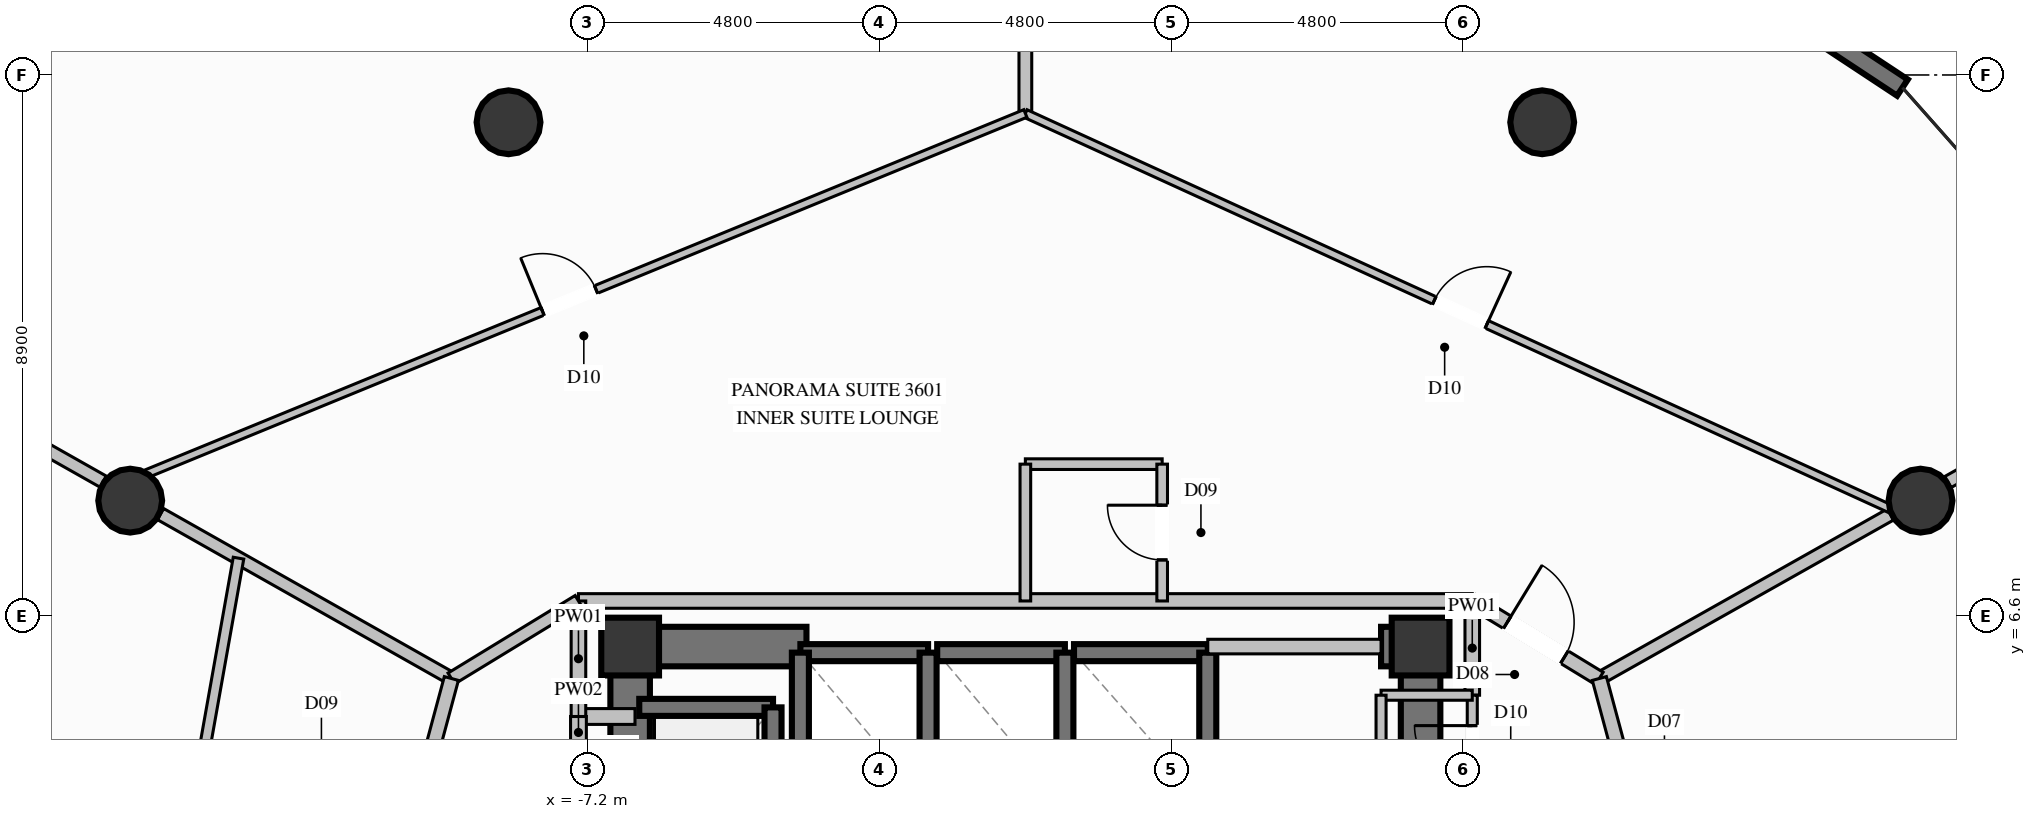
"""IFC4 building model, lengths in metres.
Left out: names, types, materials, properties, quantities, classifications, styles, units other than length and angle.
Written with IfcOpenShell. Run it as: python <this file> out.ifc"""

import sys

from ifc_helpers import new_model, si_unit, direction, frame, frame_2d, origin, origin_2d, place, context, subcontext, project, spatial, rectangle, circle, extrude, element, fill, save


model = new_model("IFC4")
c1 = context("Model", 3, precision=1e-05, world=origin(), true_north=direction((0.0, 1.0)))
c2 = subcontext(c1, "Body", "Model", "MODEL_VIEW")
j1 = project(units=[si_unit("LENGTHUNIT", "METRE"), si_unit("PLANEANGLEUNIT", "RADIAN")], contexts=[c1])
p1 = place(None, origin())
s1 = spatial("IfcSite", under=j1, at=p1, CompositionType="ELEMENT")
p2 = place(p1, origin())
s2 = spatial("IfcBuilding", under=s1, at=p2, CompositionType="ELEMENT")
p3 = place(p2, frame((0.0, 0.0, 135.0)))
s3 = spatial("IfcBuildingStorey", under=s2, at=p3, CompositionType="ELEMENT", Elevation=135.0)
for number, where, z_axis, x_axis in (
    (1, (6.5, 6.1, 0.0), (0.0, 0.0, 1.0), (1.0, 0.0, 0.0)),
    (2, (-6.5, 6.1, 0.0), (0.0, 0.0, 1.0), (1.0, 0.0, 0.0)),
):
    element("IfcColumn", number, at=place(p3, frame(where, z_axis=z_axis, x_axis=x_axis)), inside=s3, PredefinedType="COLUMN", context=c2, shape_type="SweptSolid", body=[
        extrude(rectangle(XDim=0.95, YDim=0.95, at=origin_2d()), origin(), (0.0, 0.0, 1.0), 3.6),
    ])
p4 = place(p3, frame((-6.175, 6.1, 0.0), z_axis=(0.0, 0.0, 1.0), x_axis=(1.0, 0.0, 0.0)))
e3 = element("IfcWall", 3, at=p4, inside=s3, PredefinedType="SHEAR", context=c2, shape_type="SweptSolid", body=[
    extrude(rectangle(XDim=2.575, YDim=0.65, at=frame_2d((1.288, 0.0))), origin(), (0.0, 0.0, 1.0), 3.6),
])
p5 = place(p3, frame((5.85, 6.1, 0.0), z_axis=(0.0, 0.0, 1.0), x_axis=(1.0, 0.0, 0.0)))
e4 = element("IfcWall", 4, at=p5, inside=s3, PredefinedType="SHEAR", context=c2, shape_type="SweptSolid", body=[
    extrude(rectangle(XDim=0.325, YDim=0.65, at=frame_2d((0.163, 0.0))), origin(), (0.0, 0.0, 1.0), 3.6),
])
p6 = place(p3, frame((-6.5, 2.35, 0.0), z_axis=(0.0, 0.0, 1.0), x_axis=(0.0, 1.0, 0.0)))
e5 = element("IfcWall", 5, at=p6, inside=s3, PredefinedType="SHEAR", context=c2, shape_type="SweptSolid", body=[
    extrude(rectangle(XDim=4.075, YDim=0.65, at=frame_2d((2.038, 0.0))), origin(), (0.0, 0.0, 1.0), 3.6),
])
p7 = place(p3, frame((6.5, 3.35, 0.0), z_axis=(0.0, 0.0, 1.0), x_axis=(0.0, 1.0, 0.0)))
e6 = element("IfcWall", 6, at=p7, inside=s3, PredefinedType="SHEAR", context=c2, shape_type="SweptSolid", body=[
    extrude(rectangle(XDim=3.075, YDim=0.65, at=frame_2d((1.538, 0.0))), origin(), (0.0, 0.0, 1.0), 3.6),
])
for number, where, z_axis, x_axis in (
    (7, (14.722, 8.5, 0.0), (0.0, 0.0, 1.0), (1.0, 0.0, 0.0)),
    (8, (8.5, 14.722, 0.0), (0.0, 0.0, 1.0), (1.0, 0.0, 0.0)),
    (9, (-8.5, 14.722, 0.0), (0.0, 0.0, 1.0), (1.0, 0.0, 0.0)),
    (10, (-14.722, 8.5, 0.0), (0.0, 0.0, 1.0), (1.0, 0.0, 0.0)),
):
    element("IfcColumn", number, at=place(p3, frame(where, z_axis=z_axis, x_axis=x_axis)), inside=s3, PredefinedType="COLUMN", context=c2, shape_type="SweptSolid", body=[
        extrude(circle(Radius=0.525, at=origin_2d()), origin(), (0.0, 0.0, 1.0), 3.6),
    ])
p8 = place(p3, frame((8.116, 19.456, 0.0), z_axis=(0.0, 0.0, 1.0), x_axis=(0.834605249122, -0.550848507431, 0.0)))
e11 = element("IfcWall", 11, at=p8, inside=s3, PredefinedType="SOLIDWALL", context=c2, shape_type="SweptSolid", body=[
    extrude(rectangle(XDim=7.559, YDim=0.32, at=frame_2d((3.78, 0.0))), origin(), (0.0, 0.0, 1.0), 3.35),
])
p9 = place(p8, frame((2.88, 0.0, 0.35)))
e12 = element("IfcOpeningElement", 12, at=p9, cuts=e11, PredefinedType="OPENING", context=c2, shape_type="SweptSolid", body=[
    extrude(rectangle(XDim=1.8, YDim=2.6, at=frame_2d((0.9, 1.3))), frame((0.0, 0.17, 0.0), z_axis=(0.0, -1.0, 0.0), x_axis=(1.0, 0.0, 0.0)), (0.0, 0.0, 1.0), 0.34),
])
p10 = place(p3, frame((-17.163, 15.897, 0.0), z_axis=(0.0, 0.0, 1.0), x_axis=(0.784850386513, 0.619685299802, 0.0)))
e13 = element("IfcWall", 13, at=p10, inside=s3, PredefinedType="SOLIDWALL", context=c2, shape_type="SweptSolid", body=[
    extrude(rectangle(XDim=6.369, YDim=0.32, at=frame_2d((3.185, 0.0))), origin(), (0.0, 0.0, 1.0), 3.35),
])
p11 = place(p10, frame((2.285, 0.0, 0.35)))
e14 = element("IfcOpeningElement", 14, at=p11, cuts=e13, PredefinedType="OPENING", context=c2, shape_type="SweptSolid", body=[
    extrude(rectangle(XDim=1.8, YDim=2.6, at=frame_2d((0.9, 1.3))), frame((0.0, 0.17, 0.0), z_axis=(0.0, -1.0, 0.0), x_axis=(1.0, 0.0, 0.0)), (0.0, 0.0, 1.0), 0.34),
])
p12 = place(p3, frame((-1.6, 6.0, 0.0), z_axis=(0.0, 0.0, 1.0), x_axis=(-1.0, 0.0, 0.0)))
e15 = element("IfcWall", 15, at=p12, inside=s3, PredefinedType="SOLIDWALL", context=c2, shape_type="SweptSolid", body=[
    extrude(rectangle(XDim=2.1, YDim=0.28, at=frame_2d((1.05, 0.0))), origin(), (0.0, 0.0, 1.0), 3.35),
])
for number, where, z_axis, x_axis in (
    (16, (-3.7, 6.0, 0.0), (0.0, 0.0, 1.0), (0.0, -1.0, 0.0)),
    (17, (-1.6, 3.5, 0.0), (0.0, 0.0, 1.0), (0.0, 1.0, 0.0)),
):
    element("IfcWall", number, at=place(p3, frame(where, z_axis=z_axis, x_axis=x_axis)), inside=s3, PredefinedType="SOLIDWALL", context=c2, shape_type="SweptSolid", body=[
        extrude(rectangle(XDim=2.5, YDim=0.28, at=frame_2d((1.25, 0.0))), origin(), (0.0, 0.0, 1.0), 3.35),
    ])
p13 = place(p3, frame((0.65, 6.0, 0.0), z_axis=(0.0, 0.0, 1.0), x_axis=(-1.0, 0.0, 0.0)))
e18 = element("IfcWall", 18, at=p13, inside=s3, PredefinedType="SOLIDWALL", context=c2, shape_type="SweptSolid", body=[
    extrude(rectangle(XDim=2.1, YDim=0.28, at=frame_2d((1.05, 0.0))), origin(), (0.0, 0.0, 1.0), 3.35),
])
p14 = place(p3, frame((0.65, 3.5, 0.0), z_axis=(0.0, 0.0, 1.0), x_axis=(0.0, 1.0, 0.0)))
e19 = element("IfcWall", 19, at=p14, inside=s3, PredefinedType="SOLIDWALL", context=c2, shape_type="SweptSolid", body=[
    extrude(rectangle(XDim=2.5, YDim=0.28, at=frame_2d((1.25, 0.0))), origin(), (0.0, 0.0, 1.0), 3.35),
])
p15 = place(p3, frame((3.0, 6.0, 0.0), z_axis=(0.0, 0.0, 1.0), x_axis=(-1.0, 0.0, 0.0)))
e20 = element("IfcWall", 20, at=p15, inside=s3, PredefinedType="SOLIDWALL", context=c2, shape_type="SweptSolid", body=[
    extrude(rectangle(XDim=2.2, YDim=0.28, at=frame_2d((1.1, 0.0))), origin(), (0.0, 0.0, 1.0), 3.35),
])
p16 = place(p3, frame((3.0, 3.5, 0.0), z_axis=(0.0, 0.0, 1.0), x_axis=(0.0, 1.0, 0.0)))
e21 = element("IfcWall", 21, at=p16, inside=s3, PredefinedType="SOLIDWALL", context=c2, shape_type="SweptSolid", body=[
    extrude(rectangle(XDim=2.5, YDim=0.28, at=frame_2d((1.25, 0.0))), origin(), (0.0, 0.0, 1.0), 3.35),
])
p17 = place(p3, frame((-4.15, 5.1, 0.0), z_axis=(0.0, 0.0, 1.0), x_axis=(-1.0, 0.0, 0.0)))
e22 = element("IfcWall", 22, at=p17, inside=s3, PredefinedType="SOLIDWALL", context=c2, shape_type="SweptSolid", body=[
    extrude(rectangle(XDim=2.2, YDim=0.28, at=frame_2d((1.1, 0.0))), origin(), (0.0, 0.0, 1.0), 3.35),
])
p18 = place(p3, frame((-4.15, 2.4, 0.0), z_axis=(0.0, 0.0, 1.0), x_axis=(0.0, 1.0, 0.0)))
e23 = element("IfcWall", 23, at=p18, inside=s3, PredefinedType="SOLIDWALL", context=c2, shape_type="SweptSolid", body=[
    extrude(rectangle(XDim=2.7, YDim=0.28, at=frame_2d((1.35, 0.0))), origin(), (0.0, 0.0, 1.0), 3.35),
])
p19 = place(p3, frame((-7.35, 4.95, 0.0), z_axis=(0.0, 0.0, 1.0), x_axis=(1.0, 0.0, 0.0)))
e24 = element("IfcWall", 24, at=p19, inside=s3, PredefinedType="PARTITIONING", context=c2, shape_type="SweptSolid", body=[
    extrude(rectangle(XDim=0.93, YDim=0.26, at=frame_2d((0.465, 0.0))), origin(), (0.0, 0.0, 1.0), 3.35),
])
p20 = place(p3, frame((-7.35, 2.55, 0.0), z_axis=(0.0, 0.0, 1.0), x_axis=(0.0, 1.0, 0.0)))
e25 = element("IfcWall", 25, at=p20, inside=s3, PredefinedType="PARTITIONING", context=c2, shape_type="SweptSolid", body=[
    extrude(rectangle(XDim=2.4, YDim=0.26, at=frame_2d((1.2, 0.0))), origin(), (0.0, 0.0, 1.0), 2.435),
])
p21 = place(p20, frame((0.775, 0.0, 0.0)))
e26 = element("IfcOpeningElement", 26, at=p21, cuts=e25, PredefinedType="OPENING", context=c2, shape_type="SweptSolid", body=[
    extrude(rectangle(XDim=0.85, YDim=2.05, at=frame_2d((0.425, 1.025))), frame((0.0, 0.14, 0.0), z_axis=(0.0, -1.0, 0.0), x_axis=(1.0, 0.0, 0.0)), (0.0, 0.0, 1.0), 0.28),
])
p22 = place(p3, frame((-7.35, 6.85, 0.0), z_axis=(0.0, 0.0, 1.0), x_axis=(1.0, 0.0, 0.0)))
e27 = element("IfcWall", 27, at=p22, inside=s3, PredefinedType="PARTITIONING", context=c2, shape_type="SweptSolid", body=[
    extrude(rectangle(XDim=14.7, YDim=0.24, at=frame_2d((7.35, 0.0))), origin(), (0.0, 0.0, 1.0), 2.435),
])
p23 = place(p3, frame((-7.35, 4.95, 0.0), z_axis=(0.0, 0.0, 1.0), x_axis=(0.0, 1.0, 0.0)))
e28 = element("IfcWall", 28, at=p23, inside=s3, PredefinedType="PARTITIONING", context=c2, shape_type="SweptSolid", body=[
    extrude(rectangle(XDim=1.9, YDim=0.24, at=frame_2d((0.95, 0.0))), origin(), (0.0, 0.0, 1.0), 2.435),
])
p24 = place(p3, frame((7.35, 5.3, 0.0), z_axis=(0.0, 0.0, 1.0), x_axis=(0.0, 1.0, 0.0)))
e29 = element("IfcWall", 29, at=p24, inside=s3, PredefinedType="PARTITIONING", context=c2, shape_type="SweptSolid", body=[
    extrude(rectangle(XDim=1.55, YDim=0.24, at=frame_2d((0.775, 0.0))), origin(), (0.0, 0.0, 1.0), 2.435),
])
p25 = place(p3, frame((3.0, 6.1, 0.0), z_axis=(0.0, 0.0, 1.0), x_axis=(1.0, 0.0, 0.0)))
e30 = element("IfcWall", 30, at=p25, inside=s3, PredefinedType="PARTITIONING", context=c2, shape_type="SweptSolid", body=[
    extrude(rectangle(XDim=2.85, YDim=0.24, at=frame_2d((1.425, 0.0))), origin(), (0.0, 0.0, 1.0), 2.435),
])
p26 = place(p3, frame((7.35, 3.35, 0.0), z_axis=(0.0, 0.0, 1.0), x_axis=(0.0, 1.0, 0.0)))
e31 = element("IfcWall", 31, at=p26, inside=s3, PredefinedType="PARTITIONING", context=c2, shape_type="SweptSolid", body=[
    extrude(rectangle(XDim=1.95, YDim=0.165, at=frame_2d((0.975, 0.0))), origin(), (0.0, 0.0, 1.0), 3.35),
])
p27 = place(p26, frame((0.5, 0.0, 0.0)))
e32 = element("IfcOpeningElement", 32, at=p27, cuts=e31, PredefinedType="OPENING", context=c2, shape_type="SweptSolid", body=[
    extrude(rectangle(XDim=0.95, YDim=2.1, at=frame_2d((0.475, 1.05))), frame((0.0, 0.093, 0.0), z_axis=(0.0, -1.0, 0.0), x_axis=(1.0, 0.0, 0.0)), (0.0, 0.0, 1.0), 0.185),
])
p28 = place(p3, frame((7.35, 5.3, 0.0), z_axis=(0.0, 0.0, 1.0), x_axis=(-1.0, 0.0, 0.0)))
e33 = element("IfcWall", 33, at=p28, inside=s3, PredefinedType="PARTITIONING", context=c2, shape_type="SweptSolid", body=[
    extrude(rectangle(XDim=1.5, YDim=0.165, at=frame_2d((0.75, 0.0))), origin(), (0.0, 0.0, 1.0), 2.435),
])
p29 = place(p3, frame((5.85, 5.3, 0.0), z_axis=(0.0, 0.0, 1.0), x_axis=(0.0, -1.0, 0.0)))
e34 = element("IfcWall", 34, at=p29, inside=s3, PredefinedType="PARTITIONING", context=c2, shape_type="SweptSolid", body=[
    extrude(rectangle(XDim=1.95, YDim=0.165, at=frame_2d((0.975, 0.0))), origin(), (0.0, 0.0, 1.0), 2.435),
])
p30 = place(p3, frame((9.44, 5.575, 0.0), z_axis=(0.0, 0.0, 1.0), x_axis=(0.871243078021, 0.490851809613, 0.0)))
e35 = element("IfcWall", 35, at=p30, inside=s3, PredefinedType="PARTITIONING", context=c2, shape_type="SweptSolid", body=[
    extrude(rectangle(XDim=5.495, YDim=0.21, at=frame_2d((2.747, 0.0))), origin(), (0.0, 0.0, 1.0), 2.717),
])
p31 = place(p3, frame((15.173, 8.806, 0.0), z_axis=(0.0, 0.0, 1.0), x_axis=(0.871209921186, 0.490910657071, 0.0)))
e36 = element("IfcWall", 36, at=p31, inside=s3, PredefinedType="PARTITIONING", context=c2, shape_type="SweptSolid", body=[
    extrude(rectangle(XDim=3.783, YDim=0.21, at=frame_2d((1.892, 0.0))), origin(), (0.0, 0.0, 1.0), 3.35),
])
p32 = place(p3, frame((-9.44, 5.575, 0.0), z_axis=(0.0, 0.0, 1.0), x_axis=(-0.87056283872, 0.492057256668, 0.0)))
e37 = element("IfcWall", 37, at=p32, inside=s3, PredefinedType="PARTITIONING", context=c2, shape_type="SweptSolid", body=[
    extrude(rectangle(XDim=5.496, YDim=0.21, at=frame_2d((2.748, 0.0))), origin(), (0.0, 0.0, 1.0), 2.717),
])
p33 = place(p3, frame((-15.168, 8.813, 0.0), z_axis=(0.0, 0.0, 1.0), x_axis=(-0.870568901918, 0.492046529317, 0.0)))
e38 = element("IfcWall", 38, at=p33, inside=s3, PredefinedType="PARTITIONING", context=c2, shape_type="SweptSolid", body=[
    extrude(rectangle(XDim=5.25, YDim=0.21, at=frame_2d((2.625, 0.0))), origin(), (0.0, 0.0, 1.0), 3.35),
])
for number, where, z_axis, x_axis in (
    (39, (0.0, 9.1, 0.0), (0.0, 0.0, 1.0), (1.0, 0.0, 0.0)),
    (40, (0.0, 9.1, 0.0), (0.0, 0.0, 1.0), (0.0, -1.0, 0.0)),
):
    element("IfcWall", number, at=place(p3, frame(where, z_axis=z_axis, x_axis=x_axis)), inside=s3, PredefinedType="PLUMBINGWALL", context=c2, shape_type="SweptSolid", body=[
        extrude(rectangle(XDim=2.25, YDim=0.175, at=frame_2d((1.125, 0.0))), origin(), (0.0, 0.0, 1.0), 3.35),
    ])
p34 = place(p3, frame((2.25, 6.85, 0.0), z_axis=(0.0, 0.0, 1.0), x_axis=(0.0, 1.0, 0.0)))
e41 = element("IfcWall", 41, at=p34, inside=s3, PredefinedType="PLUMBINGWALL", context=c2, shape_type="SweptSolid", body=[
    extrude(rectangle(XDim=2.25, YDim=0.175, at=frame_2d((1.125, 0.0))), origin(), (0.0, 0.0, 1.0), 3.35),
])
p35 = place(p34, frame((0.675, 0.0, 0.0)))
e42 = element("IfcOpeningElement", 42, at=p35, cuts=e41, PredefinedType="OPENING", context=c2, shape_type="SweptSolid", body=[
    extrude(rectangle(XDim=0.9, YDim=2.1, at=frame_2d((0.45, 1.05))), frame((0.0, 0.098, 0.0), z_axis=(0.0, -1.0, 0.0), x_axis=(1.0, 0.0, 0.0)), (0.0, 0.0, 1.0), 0.195),
])
p36 = place(p3, frame((-9.44, 5.575, 0.0), z_axis=(0.0, 0.0, 1.0), x_axis=(0.853641534933, 0.520860950579, 0.0)))
e43 = element("IfcWall", 43, at=p36, inside=s3, PredefinedType="PARTITIONING", context=c2, shape_type="SweptSolid", body=[
    extrude(rectangle(XDim=2.448, YDim=0.21, at=frame_2d((1.224, 0.0))), origin(), (0.0, 0.0, 1.0), 3.35),
])
p37 = place(p3, frame((7.35, 6.85, 0.0), z_axis=(0.0, 0.0, 1.0), x_axis=(0.853641534933, -0.520860950579, 0.0)))
e44 = element("IfcWall", 44, at=p37, inside=s3, PredefinedType="PARTITIONING", context=c2, shape_type="SweptSolid", body=[
    extrude(rectangle(XDim=2.448, YDim=0.24, at=frame_2d((1.224, 0.0))), origin(), (0.0, 0.0, 1.0), 3.35),
])
p38 = place(p37, frame((0.674, 0.0, 0.0)))
e45 = element("IfcOpeningElement", 45, at=p38, cuts=e44, PredefinedType="OPENING", context=c2, shape_type="SweptSolid", body=[
    extrude(rectangle(XDim=1.1, YDim=2.3, at=frame_2d((0.55, 1.15))), frame((0.0, 0.13, 0.0), z_axis=(0.0, -1.0, 0.0), x_axis=(1.0, 0.0, 0.0)), (0.0, 0.0, 1.0), 0.26),
])
p39 = place(p3, frame((0.0, 14.867, 0.0), z_axis=(0.0, 0.0, 1.0), x_axis=(0.0, 1.0, 0.0)))
e46 = element("IfcWall", 46, at=p39, inside=s3, PredefinedType="PARTITIONING", context=c2, shape_type="SweptSolid", body=[
    extrude(rectangle(XDim=1.588, YDim=0.21, at=frame_2d((0.794, 0.0))), origin(), (0.0, 0.0, 1.0), 3.35),
])
p40 = place(p3, frame((0.0, 14.867, 0.0), z_axis=(0.0, 0.0, 1.0), x_axis=(0.909485869623, -0.415734834909, 0.0)))
e47 = element("IfcWall", 47, at=p40, inside=s3, PredefinedType="PARTITIONING", context=c2, shape_type="SweptSolid", body=[
    extrude(rectangle(XDim=15.741, YDim=0.135, at=frame_2d((7.87, 0.0))), origin(), (0.0, 0.0, 1.0), 2.878),
])
p41 = place(p40, frame((7.395, 0.0, 0.0)))
e48 = element("IfcOpeningElement", 48, at=p41, cuts=e47, PredefinedType="OPENING", context=c2, shape_type="SweptSolid", body=[
    extrude(rectangle(XDim=0.95, YDim=2.1, at=frame_2d((0.475, 1.05))), frame((0.0, 0.078, 0.0), z_axis=(0.0, -1.0, 0.0), x_axis=(1.0, 0.0, 0.0)), (0.0, 0.0, 1.0), 0.155),
])
p42 = place(p3, frame((-15.001, 8.718, 0.0), z_axis=(0.0, 0.0, 1.0), x_axis=(0.925283827326, 0.379275412978, 0.0)))
e49 = element("IfcWall", 49, at=p42, inside=s3, PredefinedType="PARTITIONING", context=c2, shape_type="SweptSolid", body=[
    extrude(rectangle(XDim=16.212, YDim=0.135, at=frame_2d((8.106, 0.0))), origin(), (0.0, 0.0, 1.0), 2.806),
])
p43 = place(p42, frame((7.631, 0.0, 0.0)))
e50 = element("IfcOpeningElement", 50, at=p43, cuts=e49, PredefinedType="OPENING", context=c2, shape_type="SweptSolid", body=[
    extrude(rectangle(XDim=0.95, YDim=2.1, at=frame_2d((0.475, 1.05))), frame((0.0, 0.078, 0.0), z_axis=(0.0, -1.0, 0.0), x_axis=(1.0, 0.0, 0.0)), (0.0, 0.0, 1.0), 0.155),
])
p44 = place(p3, frame((-9.44, 5.575, 0.0), z_axis=(0.0, 0.0, 1.0), x_axis=(-0.25988439237, -0.965639737481, 0.0)))
e51 = element("IfcWall", 51, at=p44, inside=s3, PredefinedType="PARTITIONING", context=c2, shape_type="SweptSolid", body=[
    extrude(rectangle(XDim=2.359, YDim=0.24, at=frame_2d((1.179, 0.0))), origin(), (0.0, 0.0, 1.0), 3.35),
])
p45 = place(p3, frame((-12.941, 7.554, 0.0), z_axis=(0.0, 0.0, 1.0), x_axis=(-0.175195404058, -0.984533681698, 0.0)))
e52 = element("IfcWall", 52, at=p45, inside=s3, PredefinedType="PLUMBINGWALL", context=c2, shape_type="SweptSolid", body=[
    extrude(rectangle(XDim=3.18, YDim=0.175, at=frame_2d((1.59, 0.0))), origin(), (0.0, 0.0, 1.0), 3.35),
])
p46 = place(p3, frame((10.287, 2.428, 0.0), z_axis=(0.0, 0.0, 1.0), x_axis=(-0.259946608151, 0.965622991084, 0.0)))
e53 = element("IfcWall", 53, at=p46, inside=s3, PredefinedType="PARTITIONING", context=c2, shape_type="SweptSolid", body=[
    extrude(rectangle(XDim=3.259, YDim=0.24, at=frame_2d((1.629, 0.0))), origin(), (0.0, 0.0, 1.0), 3.35),
])
p47 = place(p46, frame((1.129, 0.0, 0.0)))
e54 = element("IfcOpeningElement", 54, at=p47, cuts=e53, PredefinedType="OPENING", context=c2, shape_type="SweptSolid", body=[
    extrude(rectangle(XDim=1.0, YDim=2.2, at=frame_2d((0.5, 1.1))), frame((0.0, 0.13, 0.0), z_axis=(0.0, -1.0, 0.0), x_axis=(1.0, 0.0, 0.0)), (0.0, 0.0, 1.0), 0.26),
])
p48 = place(p27, origin())
e55 = element("IfcDoor", 55, at=p48, inside=s3, OperationType="SINGLE_SWING_RIGHT", PredefinedType="DOOR", context=c2, shape_type="SweptSolid", body=[
    extrude(rectangle(XDim=0.95, YDim=2.1, at=frame_2d((0.475, 1.05))), frame((0.0, 0.025, 0.0), z_axis=(0.0, -1.0, 0.0), x_axis=(1.0, 0.0, 0.0)), (0.0, 0.0, 1.0), 0.05),
])
fill(e32, e55)
p49 = place(p35, origin())
e56 = element("IfcDoor", 56, at=p49, inside=s3, OperationType="SINGLE_SWING_RIGHT", PredefinedType="DOOR", context=c2, shape_type="SweptSolid", body=[
    extrude(rectangle(XDim=0.9, YDim=2.1, at=frame_2d((0.45, 1.05))), frame((0.0, 0.025, 0.0), z_axis=(0.0, -1.0, 0.0), x_axis=(1.0, 0.0, 0.0)), (0.0, 0.0, 1.0), 0.05),
])
fill(e42, e56)
p50 = place(p38, origin())
e57 = element("IfcDoor", 57, at=p50, inside=s3, OperationType="SINGLE_SWING_LEFT", PredefinedType="DOOR", context=c2, shape_type="SweptSolid", body=[
    extrude(rectangle(XDim=1.1, YDim=2.3, at=frame_2d((0.55, 1.15))), frame((0.0, 0.025, 0.0), z_axis=(0.0, -1.0, 0.0), x_axis=(1.0, 0.0, 0.0)), (0.0, 0.0, 1.0), 0.05),
])
fill(e45, e57)
p51 = place(p41, origin())
e58 = element("IfcDoor", 58, at=p51, inside=s3, OperationType="SINGLE_SWING_RIGHT", PredefinedType="DOOR", context=c2, shape_type="SweptSolid", body=[
    extrude(rectangle(XDim=0.95, YDim=2.1, at=frame_2d((0.475, 1.05))), frame((0.0, 0.025, 0.0), z_axis=(0.0, -1.0, 0.0), x_axis=(1.0, 0.0, 0.0)), (0.0, 0.0, 1.0), 0.05),
])
fill(e48, e58)
p52 = place(p43, origin())
e59 = element("IfcDoor", 59, at=p52, inside=s3, OperationType="SINGLE_SWING_LEFT", PredefinedType="DOOR", context=c2, shape_type="SweptSolid", body=[
    extrude(rectangle(XDim=0.95, YDim=2.1, at=frame_2d((0.475, 1.05))), frame((0.0, 0.025, 0.0), z_axis=(0.0, -1.0, 0.0), x_axis=(1.0, 0.0, 0.0)), (0.0, 0.0, 1.0), 0.05),
])
fill(e50, e59)
save(model, sys.argv[1])
